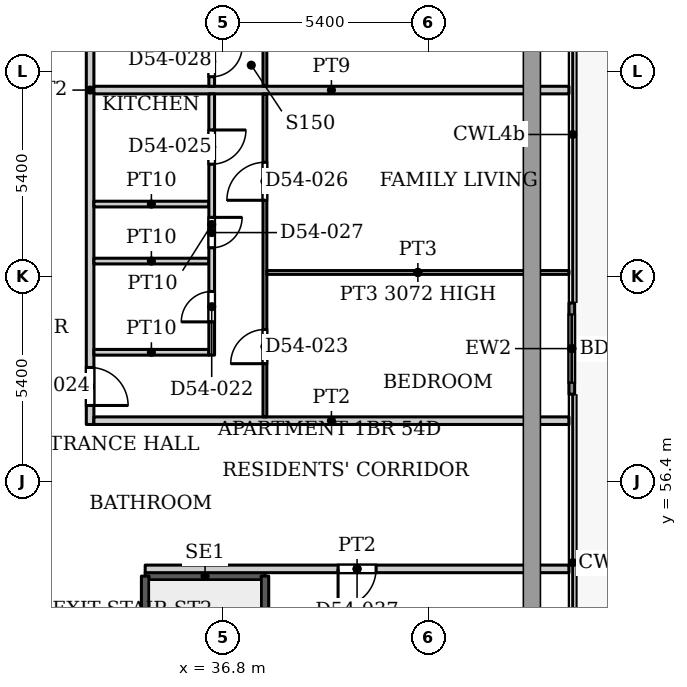
"""IFC4 building model, lengths in metres.
Left out: names, types, materials, properties, quantities, classifications, styles, units other than length and angle.
Written with IfcOpenShell. Run it as: python <this file> out.ifc"""

import sys

from ifc_helpers import new_model, si_unit, direction, frame, frame_2d, origin, place, context, subcontext, project, spatial, rectangle, extrude, source, transform, mapped, element, fill, save


model = new_model("IFC4")
c1 = context("Model", 3, precision=1e-05, world=origin(), true_north=direction((0.0, 1.0)))
c2 = subcontext(c1, "Body", "Model", "MODEL_VIEW")
j1 = project(units=[si_unit("LENGTHUNIT", "METRE"), si_unit("PLANEANGLEUNIT", "RADIAN")], contexts=[c1])
p1 = place(None, origin())
s1 = spatial("IfcSite", under=j1, at=p1, CompositionType="ELEMENT")
p2 = place(p1, origin())
s2 = spatial("IfcBuilding", under=s1, at=p2, CompositionType="ELEMENT")
p3 = place(p2, frame((0.0, 0.0, 231.8)))
s3 = spatial("IfcBuildingStorey", under=s2, at=p3, CompositionType="ELEMENT", Elevation=231.8)
p4 = place(p3, frame((45.975, 61.097, 0.0), z_axis=(0.0, 0.0, 1.0), x_axis=(0.0, -1.0, 0.0)))
e1 = element("IfcWall", 1, at=p4, inside=s3, PredefinedType="SOLIDWALL", context=c2, shape_type="SweptSolid", body=[
    extrude(rectangle(XDim=2.4, YDim=0.15, at=frame_2d((1.2, 0.0))), origin(), (0.0, 0.0, 1.0), 3.75),
])
p5 = place(p4, frame((0.3, 0.0, 0.0)))
e2 = element("IfcOpeningElement", 2, at=p5, cuts=e1, PredefinedType="OPENING", context=c2, shape_type="SweptSolid", body=[
    extrude(rectangle(XDim=1.8, YDim=2.4, at=frame_2d((0.9, 1.2))), frame((0.0, 0.085, 0.0), z_axis=(0.0, -1.0, 0.0), x_axis=(1.0, 0.0, 0.0)), (0.0, 0.0, 1.0), 0.17),
])
p6 = place(p3, frame((34.75, 53.91, 0.0), z_axis=(0.0, 0.0, 1.0), x_axis=(1.0, 0.0, 0.0)))
e3 = element("IfcWall", 3, at=p6, inside=s3, PredefinedType="SHEAR", context=c2, shape_type="SweptSolid", body=[
    extrude(rectangle(XDim=3.15, YDim=0.2, at=frame_2d((1.575, 0.0))), origin(), (0.0, 0.0, 1.0), 3.9),
])
p7 = place(p3, frame((34.75, 47.5, 0.0), z_axis=(0.0, 0.0, 1.0), x_axis=(0.0, 1.0, 0.0)))
e4 = element("IfcWall", 4, at=p7, inside=s3, PredefinedType="SHEAR", context=c2, shape_type="SweptSolid", body=[
    extrude(rectangle(XDim=6.41, YDim=0.2, at=frame_2d((3.205, 0.0))), origin(), (0.0, 0.0, 1.0), 3.9),
])
p8 = place(p3, frame((37.9, 44.75, 0.0), z_axis=(0.0, 0.0, 1.0), x_axis=(0.0, 1.0, 0.0)))
e5 = element("IfcWall", 5, at=p8, inside=s3, PredefinedType="SHEAR", context=c2, shape_type="SweptSolid", body=[
    extrude(rectangle(XDim=9.16, YDim=0.2, at=frame_2d((4.58, 0.0))), origin(), (0.0, 0.0, 1.0), 3.9),
])
p9 = place(p3, frame((33.3, 57.9, 0.0), z_axis=(0.0, 0.0, 1.0), x_axis=(0.0, 1.0, 0.0)))
e6 = element("IfcWall", 6, at=p9, inside=s3, PredefinedType="PARTITIONING", context=c2, shape_type="SweptSolid", body=[
    extrude(rectangle(XDim=17.6, YDim=0.2, at=frame_2d((8.8, 0.0))), origin(), (0.0, 0.0, 1.0), 3.6),
])
p10 = place(p9, frame((0.5, 0.0, 0.0)))
e7 = element("IfcOpeningElement", 7, at=p10, cuts=e6, PredefinedType="OPENING", context=c2, shape_type="SweptSolid", body=[
    extrude(rectangle(XDim=1.0, YDim=2.1, at=frame_2d((0.5, 1.05))), frame((0.0, 0.11, 0.0), z_axis=(0.0, -1.0, 0.0), x_axis=(1.0, 0.0, 0.0)), (0.0, 0.0, 1.0), 0.22),
])
p11 = place(p9, frame((16.1, 0.0, 0.0)))
e8 = element("IfcOpeningElement", 8, at=p11, cuts=e6, PredefinedType="OPENING", context=c2, shape_type="SweptSolid", body=[
    extrude(rectangle(XDim=1.0, YDim=2.1, at=frame_2d((0.5, 1.05))), frame((0.0, 0.11, 0.0), z_axis=(0.0, -1.0, 0.0), x_axis=(1.0, 0.0, 0.0)), (0.0, 0.0, 1.0), 0.22),
])
p12 = place(p3, frame((33.4, 58.0, 0.0), z_axis=(0.0, 0.0, 1.0), x_axis=(1.0, 0.0, 0.0)))
e9 = element("IfcWall", 9, at=p12, inside=s3, PredefinedType="PARTITIONING", context=c2, shape_type="SweptSolid", body=[
    extrude(rectangle(XDim=12.5, YDim=0.2, at=frame_2d((6.25, 0.0))), origin(), (0.0, 0.0, 1.0), 3.6),
])
for number, where, z_axis, x_axis in (
    (10, (33.4, 59.8, 0.0), (0.0, 0.0, 1.0), (1.0, 0.0, 0.0)),
    (11, (33.4, 62.2, 0.0), (0.0, 0.0, 1.0), (1.0, 0.0, 0.0)),
    (12, (33.4, 63.7, 0.0), (0.0, 0.0, 1.0), (1.0, 0.0, 0.0)),
):
    element("IfcWall", number, at=place(p3, frame(where, z_axis=z_axis, x_axis=x_axis)), inside=s3, PredefinedType="PARTITIONING", context=c2, shape_type="SweptSolid", body=[
        extrude(rectangle(XDim=3.025, YDim=0.15, at=frame_2d((1.513, 0.0))), origin(), (0.0, 0.0, 1.0), 3.6),
    ])
p13 = place(p3, frame((33.4, 66.7, 0.0), z_axis=(0.0, 0.0, 1.0), x_axis=(1.0, 0.0, 0.0)))
e13 = element("IfcWall", 13, at=p13, inside=s3, PredefinedType="PARTITIONING", context=c2, shape_type="SweptSolid", body=[
    extrude(rectangle(XDim=12.5, YDim=0.2, at=frame_2d((6.25, 0.0))), origin(), (0.0, 0.0, 1.0), 3.6),
])
p14 = place(p3, frame((34.75, 54.1, 0.0), z_axis=(0.0, 0.0, 1.0), x_axis=(1.0, 0.0, 0.0)))
e14 = element("IfcWall", 14, at=p14, inside=s3, PredefinedType="PARTITIONING", context=c2, shape_type="SweptSolid", body=[
    extrude(rectangle(XDim=11.15, YDim=0.2, at=frame_2d((5.575, 0.0))), origin(), (0.0, 0.0, 1.0), 3.6),
])
p15 = place(p14, frame((5.075, 0.0, 0.0)))
e15 = element("IfcOpeningElement", 15, at=p15, cuts=e14, PredefinedType="OPENING", context=c2, shape_type="SweptSolid", body=[
    extrude(rectangle(XDim=1.0, YDim=2.1, at=frame_2d((0.5, 1.05))), frame((0.0, 0.11, 0.0), z_axis=(0.0, -1.0, 0.0), x_axis=(1.0, 0.0, 0.0)), (0.0, 0.0, 1.0), 0.22),
])
p16 = place(p3, frame((36.5, 59.725, 0.0), z_axis=(0.0, 0.0, 1.0), x_axis=(0.0, 1.0, 0.0)))
e16 = element("IfcWall", 16, at=p16, inside=s3, PredefinedType="PARTITIONING", context=c2, shape_type="SweptSolid", body=[
    extrude(rectangle(XDim=6.875, YDim=0.15, at=frame_2d((3.438, 0.0))), origin(), (0.0, 0.0, 1.0), 3.6),
])
p17 = place(p16, frame((0.875, 0.0, 0.0)))
e17 = element("IfcOpeningElement", 17, at=p17, cuts=e16, PredefinedType="OPENING", context=c2, shape_type="SweptSolid", body=[
    extrude(rectangle(XDim=0.8, YDim=2.1, at=frame_2d((0.4, 1.05))), frame((0.0, 0.085, 0.0), z_axis=(0.0, -1.0, 0.0), x_axis=(1.0, 0.0, 0.0)), (0.0, 0.0, 1.0), 0.17),
])
p18 = place(p16, frame((5.025, 0.0, 0.0)))
e18 = element("IfcOpeningElement", 18, at=p18, cuts=e16, PredefinedType="OPENING", context=c2, shape_type="SweptSolid", body=[
    extrude(rectangle(XDim=0.9, YDim=2.1, at=frame_2d((0.45, 1.05))), frame((0.0, 0.085, 0.0), z_axis=(0.0, -1.0, 0.0), x_axis=(1.0, 0.0, 0.0)), (0.0, 0.0, 1.0), 0.17),
])
p19 = place(p16, frame((2.825, 0.0, 0.0)))
e19 = element("IfcOpeningElement", 19, at=p19, cuts=e16, PredefinedType="OPENING", context=c2, shape_type="SweptSolid", body=[
    extrude(rectangle(XDim=0.8, YDim=2.1, at=frame_2d((0.4, 1.05))), frame((0.0, 0.085, 0.0), z_axis=(0.0, -1.0, 0.0), x_axis=(1.0, 0.0, 0.0)), (0.0, 0.0, 1.0), 0.17),
])
p20 = place(p3, frame((36.5, 66.8, 0.0), z_axis=(0.0, 0.0, 1.0), x_axis=(0.0, 1.0, 0.0)))
e20 = element("IfcWall", 20, at=p20, inside=s3, PredefinedType="PARTITIONING", context=c2, shape_type="SweptSolid", body=[
    extrude(rectangle(XDim=6.85, YDim=0.15, at=frame_2d((3.425, 0.0))), origin(), (0.0, 0.0, 1.0), 3.6),
])
p21 = place(p20, frame((2.2, 0.0, 0.0)))
e21 = element("IfcOpeningElement", 21, at=p21, cuts=e20, PredefinedType="OPENING", context=c2, shape_type="SweptSolid", body=[
    extrude(rectangle(XDim=0.8, YDim=2.1, at=frame_2d((0.4, 1.05))), frame((0.0, 0.085, 0.0), z_axis=(0.0, -1.0, 0.0), x_axis=(1.0, 0.0, 0.0)), (0.0, 0.0, 1.0), 0.17),
])
p22 = place(p20, frame((4.85, 0.0, 0.0)))
e22 = element("IfcOpeningElement", 22, at=p22, cuts=e20, PredefinedType="OPENING", context=c2, shape_type="SweptSolid", body=[
    extrude(rectangle(XDim=0.9, YDim=2.1, at=frame_2d((0.45, 1.05))), frame((0.0, 0.085, 0.0), z_axis=(0.0, -1.0, 0.0), x_axis=(1.0, 0.0, 0.0)), (0.0, 0.0, 1.0), 0.17),
])
p23 = place(p20, frame((0.25, 0.0, 0.0)))
e23 = element("IfcOpeningElement", 23, at=p23, cuts=e20, PredefinedType="OPENING", context=c2, shape_type="SweptSolid", body=[
    extrude(rectangle(XDim=0.8, YDim=2.1, at=frame_2d((0.4, 1.05))), frame((0.0, 0.085, 0.0), z_axis=(0.0, -1.0, 0.0), x_axis=(1.0, 0.0, 0.0)), (0.0, 0.0, 1.0), 0.17),
])
p24 = place(p3, frame((37.9, 58.1, 0.0), z_axis=(0.0, 0.0, 1.0), x_axis=(0.0, 1.0, 0.0)))
e24 = element("IfcWall", 24, at=p24, inside=s3, PredefinedType="PARTITIONING", context=c2, shape_type="SweptSolid", body=[
    extrude(rectangle(XDim=8.5, YDim=0.1, at=frame_2d((4.25, 0.0))), origin(), (0.0, 0.0, 1.0), 3.6),
])
p25 = place(p24, frame((1.4, 0.0, 0.0)))
e25 = element("IfcOpeningElement", 25, at=p25, cuts=e24, PredefinedType="OPENING", context=c2, shape_type="SweptSolid", body=[
    extrude(rectangle(XDim=0.9, YDim=2.1, at=frame_2d((0.45, 1.05))), frame((0.0, 0.06, 0.0), z_axis=(0.0, -1.0, 0.0), x_axis=(1.0, 0.0, 0.0)), (0.0, 0.0, 1.0), 0.12),
])
p26 = place(p24, frame((5.7, 0.0, 0.0)))
e26 = element("IfcOpeningElement", 26, at=p26, cuts=e24, PredefinedType="OPENING", context=c2, shape_type="SweptSolid", body=[
    extrude(rectangle(XDim=1.0, YDim=2.1, at=frame_2d((0.5, 1.05))), frame((0.0, 0.06, 0.0), z_axis=(0.0, -1.0, 0.0), x_axis=(1.0, 0.0, 0.0)), (0.0, 0.0, 1.0), 0.12),
])
p27 = place(p3, frame((37.9, 66.8, 0.0), z_axis=(0.0, 0.0, 1.0), x_axis=(0.0, 1.0, 0.0)))
e27 = element("IfcWall", 27, at=p27, inside=s3, PredefinedType="PARTITIONING", context=c2, shape_type="SweptSolid", body=[
    extrude(rectangle(XDim=8.5, YDim=0.1, at=frame_2d((4.25, 0.0))), origin(), (0.0, 0.0, 1.0), 3.6),
])
p28 = place(p27, frame((6.2, 0.0, 0.0)))
e28 = element("IfcOpeningElement", 28, at=p28, cuts=e27, PredefinedType="OPENING", context=c2, shape_type="SweptSolid", body=[
    extrude(rectangle(XDim=0.9, YDim=2.1, at=frame_2d((0.45, 1.05))), frame((0.0, 0.06, 0.0), z_axis=(0.0, -1.0, 0.0), x_axis=(1.0, 0.0, 0.0)), (0.0, 0.0, 1.0), 0.12),
])
p29 = place(p27, frame((1.8, 0.0, 0.0)))
e29 = element("IfcOpeningElement", 29, at=p29, cuts=e27, PredefinedType="OPENING", context=c2, shape_type="SweptSolid", body=[
    extrude(rectangle(XDim=1.0, YDim=2.1, at=frame_2d((0.5, 1.05))), frame((0.0, 0.06, 0.0), z_axis=(0.0, -1.0, 0.0), x_axis=(1.0, 0.0, 0.0)), (0.0, 0.0, 1.0), 0.12),
])
p30 = place(p3, frame((37.95, 61.9, 0.0), z_axis=(0.0, 0.0, 1.0), x_axis=(1.0, 0.0, 0.0)))
e30 = element("IfcWall", 30, at=p30, inside=s3, PredefinedType="PARTITIONING", context=c2, shape_type="SweptSolid", body=[
    extrude(rectangle(XDim=7.95, YDim=0.1, at=frame_2d((3.975, 0.0))), origin(), (0.0, 0.0, 1.0), 3.072),
])
m1 = source(origin(), c2, "Body", "SweptSolid", [
    extrude(rectangle(XDim=1.8, YDim=2.4, at=frame_2d((0.9, 1.2))), frame((0.0, 0.025, 0.0), z_axis=(0.0, -1.0, 0.0), x_axis=(1.0, 0.0, 0.0)), (0.0, 0.0, 1.0), 0.05),
])
p31 = place(p5, origin())
e31 = element("IfcDoor", 31, at=p31, inside=s3, OperationType="SLIDING_TO_LEFT", PredefinedType="DOOR", context=c2, shape_type="MappedRepresentation", body=[
    mapped(m1, transform((0.0, 0.0, 0.0), x_axis=(1.0, 0.0, 0.0), y_axis=(0.0, 1.0, 0.0), z_axis=(0.0, 0.0, 1.0), scale=1.0)),
])
fill(e2, e31)
m2 = source(origin(), c2, "Body", "SweptSolid", [
    extrude(rectangle(XDim=0.8, YDim=2.1, at=frame_2d((0.4, 1.05))), frame((0.0, 0.025, 0.0), z_axis=(0.0, -1.0, 0.0), x_axis=(1.0, 0.0, 0.0)), (0.0, 0.0, 1.0), 0.05),
])
p32 = place(p17, origin())
e32 = element("IfcDoor", 32, at=p32, inside=s3, OperationType="SINGLE_SWING_LEFT", PredefinedType="DOOR", context=c2, shape_type="MappedRepresentation", body=[
    mapped(m2, transform((0.0, 0.0, 0.0), x_axis=(1.0, 0.0, 0.0), y_axis=(0.0, 1.0, 0.0), z_axis=(0.0, 0.0, 1.0), scale=1.0)),
])
fill(e17, e32)
m3 = source(origin(), c2, "Body", "SweptSolid", [
    extrude(rectangle(XDim=0.9, YDim=2.1, at=frame_2d((0.45, 1.05))), frame((0.0, 0.025, 0.0), z_axis=(0.0, -1.0, 0.0), x_axis=(1.0, 0.0, 0.0)), (0.0, 0.0, 1.0), 0.05),
])
p33 = place(p25, origin())
e33 = element("IfcDoor", 33, at=p33, inside=s3, OperationType="SINGLE_SWING_LEFT", PredefinedType="DOOR", context=c2, shape_type="MappedRepresentation", body=[
    mapped(m3, transform((0.0, 0.0, 0.0), x_axis=(1.0, 0.0, 0.0), y_axis=(0.0, 1.0, 0.0), z_axis=(0.0, 0.0, 1.0), scale=1.0)),
])
fill(e25, e33)
m4 = source(origin(), c2, "Body", "SweptSolid", [
    extrude(rectangle(XDim=1.0, YDim=2.1, at=frame_2d((0.5, 1.05))), frame((0.0, 0.025, 0.0), z_axis=(0.0, -1.0, 0.0), x_axis=(1.0, 0.0, 0.0)), (0.0, 0.0, 1.0), 0.05),
])
p34 = place(p10, origin())
e34 = element("IfcDoor", 34, at=p34, inside=s3, OperationType="SINGLE_SWING_RIGHT", PredefinedType="DOOR", context=c2, shape_type="MappedRepresentation", body=[
    mapped(m4, transform((0.0, 0.0, 0.0), x_axis=(1.0, 0.0, 0.0), y_axis=(0.0, 1.0, 0.0), z_axis=(0.0, 0.0, 1.0), scale=1.0)),
])
fill(e7, e34)
p35 = place(p18, origin())
e35 = element("IfcDoor", 35, at=p35, inside=s3, OperationType="SINGLE_SWING_RIGHT", PredefinedType="DOOR", context=c2, shape_type="MappedRepresentation", body=[
    mapped(m3, transform((0.0, 0.0, 0.0), x_axis=(1.0, 0.0, 0.0), y_axis=(0.0, 1.0, 0.0), z_axis=(0.0, 0.0, 1.0), scale=1.0)),
])
fill(e18, e35)
m5 = source(origin(), c2, "Body", "SweptSolid", [
    extrude(rectangle(XDim=1.0, YDim=2.1, at=frame_2d((0.5, 1.05))), frame((0.0, 0.025, 0.0), z_axis=(0.0, -1.0, 0.0), x_axis=(1.0, 0.0, 0.0)), (0.0, 0.0, 1.0), 0.05),
])
p36 = place(p26, origin())
e36 = element("IfcDoor", 36, at=p36, inside=s3, OperationType="SINGLE_SWING_LEFT", PredefinedType="DOOR", context=c2, shape_type="MappedRepresentation", body=[
    mapped(m5, transform((0.0, 0.0, 0.0), x_axis=(1.0, 0.0, 0.0), y_axis=(0.0, 1.0, 0.0), z_axis=(0.0, 0.0, 1.0), scale=1.0)),
])
fill(e26, e36)
p37 = place(p19, origin())
e37 = element("IfcDoor", 37, at=p37, inside=s3, OperationType="SINGLE_SWING_RIGHT", PredefinedType="DOOR", context=c2, shape_type="MappedRepresentation", body=[
    mapped(m2, transform((0.0, 0.0, 0.0), x_axis=(1.0, 0.0, 0.0), y_axis=(0.0, 1.0, 0.0), z_axis=(0.0, 0.0, 1.0), scale=1.0)),
])
fill(e19, e37)
p38 = place(p23, origin())
e38 = element("IfcDoor", 38, at=p38, inside=s3, OperationType="SINGLE_SWING_RIGHT", PredefinedType="DOOR", context=c2, shape_type="MappedRepresentation", body=[
    mapped(m2, transform((0.0, 0.0, 0.0), x_axis=(1.0, 0.0, 0.0), y_axis=(0.0, 1.0, 0.0), z_axis=(0.0, 0.0, 1.0), scale=1.0)),
])
fill(e23, e38)
m6 = source(origin(), c2, "Body", "SweptSolid", [
    extrude(rectangle(XDim=1.0, YDim=2.1, at=frame_2d((0.5, 1.05))), frame((0.0, 0.025, 0.0), z_axis=(0.0, -1.0, 0.0), x_axis=(1.0, 0.0, 0.0)), (0.0, 0.0, 1.0), 0.05),
])
p39 = place(p15, origin())
e39 = element("IfcDoor", 39, at=p39, inside=s3, OperationType="SINGLE_SWING_RIGHT", PredefinedType="DOOR", context=c2, shape_type="MappedRepresentation", body=[
    mapped(m6, transform((0.0, 0.0, 0.0), x_axis=(1.0, 0.0, 0.0), y_axis=(0.0, 1.0, 0.0), z_axis=(0.0, 0.0, 1.0), scale=1.0)),
])
fill(e15, e39)
save(model, sys.argv[1])
